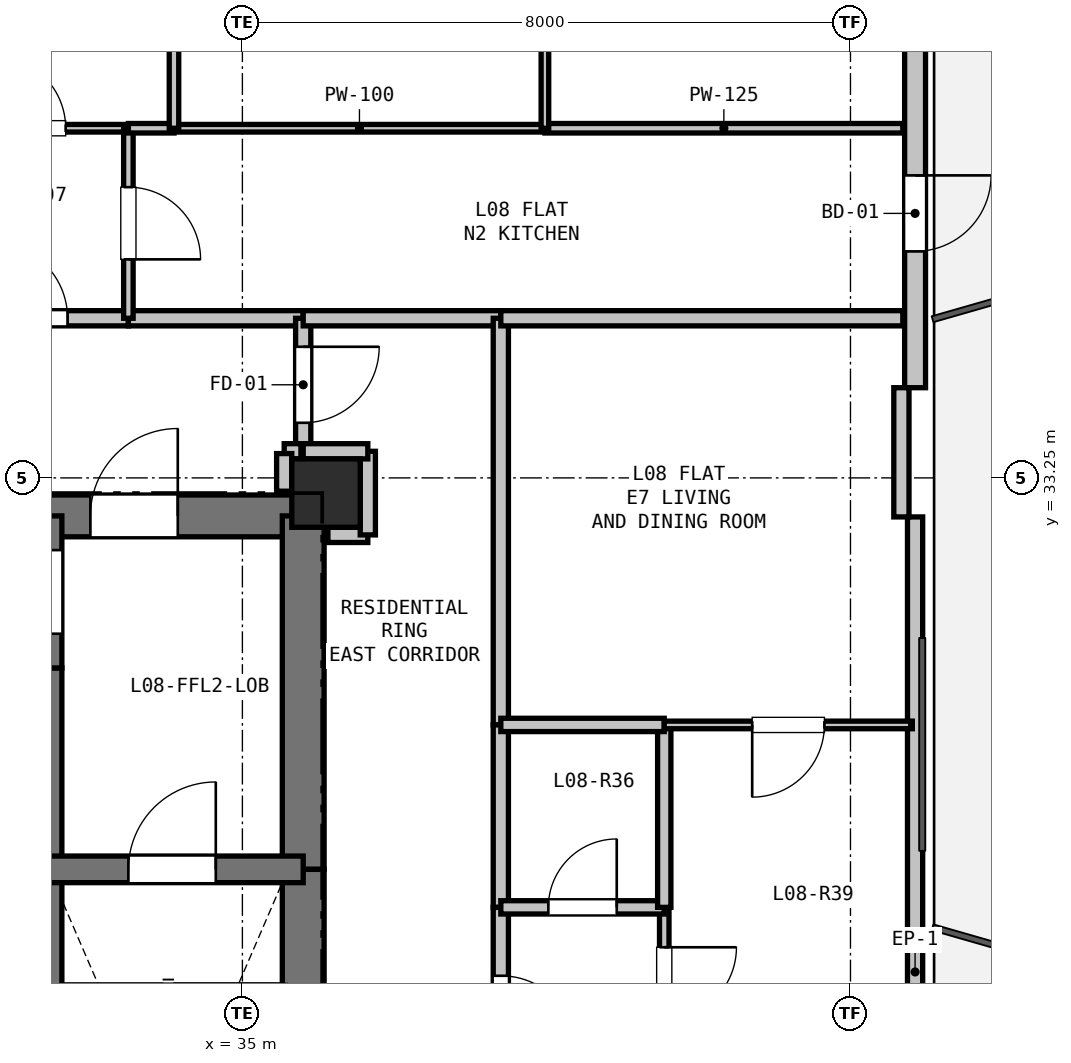
"""IFC4 building model, lengths in metres.
Left out: names, types, materials, properties, quantities, classifications, styles, units other than length and angle.
Written with IfcOpenShell. Run it as: python <this file> out.ifc"""

import sys

from ifc_helpers import new_model, si_unit, direction, frame, frame_2d, origin, origin_2d, place, context, subcontext, project, spatial, rectangle, extrude, element, fill, save


model = new_model("IFC4")
c1 = context("Model", 3, precision=1e-05, world=origin(), true_north=direction((0.0, 1.0)))
c2 = subcontext(c1, "Body", "Model", "MODEL_VIEW")
j1 = project(units=[si_unit("LENGTHUNIT", "METRE"), si_unit("PLANEANGLEUNIT", "RADIAN")], contexts=[c1])
p1 = place(None, origin())
s1 = spatial("IfcSite", under=j1, at=p1, CompositionType="ELEMENT")
p2 = place(p1, origin())
s2 = spatial("IfcBuilding", under=s1, at=p2, CompositionType="ELEMENT")
p3 = place(p2, frame((0.0, 0.0, 32.4)))
s3 = spatial("IfcBuildingStorey", under=s2, at=p3, CompositionType="ELEMENT", Elevation=32.4)
p4 = place(p3, frame((36.1, 33.05, 0.0), z_axis=(0.0, 0.0, 1.0), x_axis=(1.0, 0.0, 0.0)))
e1 = element("IfcColumn", 1, at=p4, inside=s3, PredefinedType="COLUMN", context=c2, shape_type="SweptSolid", body=[
    extrude(rectangle(XDim=0.9, YDim=0.9, at=origin_2d()), origin(), (0.0, 0.0, 1.0), 3.3),
])
p5 = place(p3, frame((43.85, 47.11, 0.0), z_axis=(0.0, 0.0, 1.0), x_axis=(0.0, -1.0, 0.0)))
e2 = element("IfcWall", 2, at=p5, inside=s3, PredefinedType="SOLIDWALL", context=c2, shape_type="SweptSolid", body=[
    extrude(rectangle(XDim=12.673, YDim=0.275, at=frame_2d((6.336, 0.0))), origin(), (0.0, 0.0, 1.0), 2.66),
])
p6 = place(p5, frame((9.88, 0.0, 0.0)))
e3 = element("IfcOpeningElement", 3, at=p6, cuts=e2, PredefinedType="OPENING", context=c2, shape_type="SweptSolid", body=[
    extrude(rectangle(XDim=1.0, YDim=2.1, at=frame_2d((0.5, 1.05))), frame((0.0, 0.147, 0.0), z_axis=(0.0, -1.0, 0.0), x_axis=(1.0, 0.0, 0.0)), (0.0, 0.0, 1.0), 0.295),
])
p7 = place(p3, frame((43.85, 32.737, 0.0), z_axis=(0.0, 0.0, 1.0), x_axis=(0.0, -1.0, 0.0)))
e4 = element("IfcWall", 4, at=p7, inside=s3, PredefinedType="PARAPET", context=c2, shape_type="SweptSolid", body=[
    extrude(rectangle(XDim=11.973, YDim=0.2, at=frame_2d((5.987, 0.0))), origin(), (0.0, 0.0, 1.0), 0.2),
])
p8 = place(p3, frame((43.67, 34.437, 0.0), z_axis=(0.0, 0.0, 1.0), x_axis=(0.0, -1.0, 0.0)))
e5 = element("IfcWall", 5, at=p8, inside=s3, PredefinedType="PARAPET", context=c2, shape_type="SweptSolid", body=[
    extrude(rectangle(XDim=1.7, YDim=0.2, at=frame_2d((0.85, 0.0))), origin(), (0.0, 0.0, 1.0), 2.66),
])
p9 = place(p3, frame((32.35, 32.75, 0.0), z_axis=(0.0, 0.0, 1.0), x_axis=(1.0, 0.0, 0.0)))
e6 = element("IfcWall", 6, at=p9, inside=s3, PredefinedType="SHEAR", context=c2, shape_type="SweptSolid", body=[
    extrude(rectangle(XDim=3.45, YDim=0.55, at=frame_2d((1.725, 0.0))), origin(), (0.0, 0.0, 1.0), 3.04),
])
p10 = place(p9, frame((0.65, 0.0, 0.0)))
e7 = element("IfcOpeningElement", 7, at=p10, cuts=e6, PredefinedType="OPENING", context=c2, shape_type="SweptSolid", body=[
    extrude(rectangle(XDim=1.15, YDim=2.15, at=frame_2d((0.575, 1.075))), frame((0.0, 0.285, 0.0), z_axis=(0.0, -1.0, 0.0), x_axis=(1.0, 0.0, 0.0)), (0.0, 0.0, 1.0), 0.57),
])
p11 = place(p3, frame((35.8, 32.75, 0.0), z_axis=(0.0, 0.0, 1.0), x_axis=(0.0, -1.0, 0.0)))
e8 = element("IfcWall", 8, at=p11, inside=s3, PredefinedType="SHEAR", context=c2, shape_type="SweptSolid", body=[
    extrude(rectangle(XDim=4.65, YDim=0.55, at=frame_2d((2.325, 0.0))), origin(), (0.0, 0.0, 1.0), 3.04),
])
p12 = place(p3, frame((35.8, 28.1, 0.0), z_axis=(0.0, 0.0, 1.0), x_axis=(0.0, -1.0, 0.0)))
e9 = element("IfcWall", 9, at=p12, inside=s3, PredefinedType="SHEAR", context=c2, shape_type="SweptSolid", body=[
    extrude(rectangle(XDim=7.35, YDim=0.55, at=frame_2d((3.675, 0.0))), origin(), (0.0, 0.0, 1.0), 3.04),
])
p13 = place(p3, frame((32.35, 25.55, 0.0), z_axis=(0.0, 0.0, 1.0), x_axis=(0.0, 1.0, 0.0)))
e10 = element("IfcWall", 10, at=p13, inside=s3, PredefinedType="SHEAR", context=c2, shape_type="SweptSolid", body=[
    extrude(rectangle(XDim=2.4, YDim=0.55, at=frame_2d((1.2, 0.0))), origin(), (0.0, 0.0, 1.0), 3.04),
])
p14 = place(p3, frame((32.35, 27.95, 0.0), z_axis=(0.0, 0.0, 1.0), x_axis=(0.0, 1.0, 0.0)))
e11 = element("IfcWall", 11, at=p14, inside=s3, PredefinedType="SHEAR", context=c2, shape_type="SweptSolid", body=[
    extrude(rectangle(XDim=2.8, YDim=0.55, at=frame_2d((1.4, 0.0))), origin(), (0.0, 0.0, 1.0), 3.04),
])
p15 = place(p3, frame((32.35, 30.75, 0.0), z_axis=(0.0, 0.0, 1.0), x_axis=(0.0, 1.0, 0.0)))
e12 = element("IfcWall", 12, at=p15, inside=s3, PredefinedType="SHEAR", context=c2, shape_type="SweptSolid", body=[
    extrude(rectangle(XDim=2.0, YDim=0.55, at=frame_2d((1.0, 0.0))), origin(), (0.0, 0.0, 1.0), 3.04),
])
p16 = place(p15, frame((0.45, 0.0, 0.0)))
e13 = element("IfcOpeningElement", 13, at=p16, cuts=e12, PredefinedType="OPENING", context=c2, shape_type="SweptSolid", body=[
    extrude(rectangle(XDim=1.1, YDim=2.15, at=frame_2d((0.55, 1.075))), frame((0.0, 0.285, 0.0), z_axis=(0.0, -1.0, 0.0), x_axis=(1.0, 0.0, 0.0)), (0.0, 0.0, 1.0), 0.57),
])
p17 = place(p3, frame((32.35, 28.1, 0.0), z_axis=(0.0, 0.0, 1.0), x_axis=(1.0, 0.0, 0.0)))
e14 = element("IfcWall", 14, at=p17, inside=s3, PredefinedType="SHEAR", context=c2, shape_type="SweptSolid", body=[
    extrude(rectangle(XDim=3.45, YDim=0.35, at=frame_2d((1.725, 0.0))), origin(), (0.0, 0.0, 1.0), 3.04),
])
p18 = place(p17, frame((1.15, 0.0, 0.0)))
e15 = element("IfcOpeningElement", 15, at=p18, cuts=e14, PredefinedType="OPENING", context=c2, shape_type="SweptSolid", body=[
    extrude(rectangle(XDim=1.15, YDim=2.15, at=frame_2d((0.575, 1.075))), frame((0.0, 0.185, 0.0), z_axis=(0.0, -1.0, 0.0), x_axis=(1.0, 0.0, 0.0)), (0.0, 0.0, 1.0), 0.37),
])
p19 = place(p3, frame((30.9, 35.35, 0.0), z_axis=(0.0, 0.0, 1.0), x_axis=(1.0, 0.0, 0.0)))
e16 = element("IfcWall", 16, at=p19, inside=s3, PredefinedType="PARTITIONING", context=c2, shape_type="SweptSolid", body=[
    extrude(rectangle(XDim=2.6, YDim=0.2, at=frame_2d((1.3, 0.0))), origin(), (0.0, 0.0, 1.0), 3.04),
])
p20 = place(p19, frame((0.8, 0.0, 0.0)))
e17 = element("IfcOpeningElement", 17, at=p20, cuts=e16, PredefinedType="OPENING", context=c2, shape_type="SweptSolid", body=[
    extrude(rectangle(XDim=1.0, YDim=2.15, at=frame_2d((0.5, 1.075))), frame((0.0, 0.11, 0.0), z_axis=(0.0, -1.0, 0.0), x_axis=(1.0, 0.0, 0.0)), (0.0, 0.0, 1.0), 0.22),
])
p21 = place(p3, frame((33.5, 35.35, 0.0), z_axis=(0.0, 0.0, 1.0), x_axis=(1.0, 0.0, 0.0)))
e18 = element("IfcWall", 18, at=p21, inside=s3, PredefinedType="PARTITIONING", context=c2, shape_type="SweptSolid", body=[
    extrude(rectangle(XDim=2.3, YDim=0.2, at=frame_2d((1.15, 0.0))), origin(), (0.0, 0.0, 1.0), 3.04),
])
p22 = place(p3, frame((35.8, 35.35, 0.0), z_axis=(0.0, 0.0, 1.0), x_axis=(0.0, -1.0, 0.0)))
e19 = element("IfcWall", 19, at=p22, inside=s3, PredefinedType="PARTITIONING", context=c2, shape_type="SweptSolid", body=[
    extrude(rectangle(XDim=1.75, YDim=0.2, at=frame_2d((0.875, 0.0))), origin(), (0.0, 0.0, 1.0), 3.04),
])
p23 = place(p22, frame((0.375, 0.0, 0.0)))
e20 = element("IfcOpeningElement", 20, at=p23, cuts=e19, PredefinedType="OPENING", context=c2, shape_type="SweptSolid", body=[
    extrude(rectangle(XDim=1.0, YDim=2.15, at=frame_2d((0.5, 1.075))), frame((0.0, 0.11, 0.0), z_axis=(0.0, -1.0, 0.0), x_axis=(1.0, 0.0, 0.0)), (0.0, 0.0, 1.0), 0.22),
])
p24 = place(p3, frame((35.77, 33.6, 0.0), z_axis=(0.0, 0.0, 1.0), x_axis=(-1.0, 0.0, 0.0)))
e21 = element("IfcWall", 21, at=p24, inside=s3, PredefinedType="PARTITIONING", context=c2, shape_type="SweptSolid", body=[
    extrude(rectangle(XDim=0.22, YDim=0.2, at=frame_2d((0.11, 0.0))), origin(), (0.0, 0.0, 1.0), 3.04),
])
p25 = place(p3, frame((35.55, 33.57, 0.0), z_axis=(0.0, 0.0, 1.0), x_axis=(0.0, -1.0, 0.0)))
e22 = element("IfcWall", 22, at=p25, inside=s3, PredefinedType="PARTITIONING", context=c2, shape_type="SweptSolid", body=[
    extrude(rectangle(XDim=0.495, YDim=0.2, at=frame_2d((0.248, 0.0))), origin(), (0.0, 0.0, 1.0), 2.488),
])
p26 = place(p3, frame((36.125, 32.5, 0.0), z_axis=(0.0, 0.0, 1.0), x_axis=(1.0, 0.0, 0.0)))
e23 = element("IfcWall", 23, at=p26, inside=s3, PredefinedType="PARTITIONING", context=c2, shape_type="SweptSolid", body=[
    extrude(rectangle(XDim=0.525, YDim=0.2, at=frame_2d((0.262, 0.0))), origin(), (0.0, 0.0, 1.0), 2.488),
])
p27 = place(p3, frame((36.65, 32.5, 0.0), z_axis=(0.0, 0.0, 1.0), x_axis=(0.0, 1.0, 0.0)))
e24 = element("IfcWall", 24, at=p27, inside=s3, PredefinedType="PARTITIONING", context=c2, shape_type="SweptSolid", body=[
    extrude(rectangle(XDim=1.1, YDim=0.2, at=frame_2d((0.55, 0.0))), origin(), (0.0, 0.0, 1.0), 2.338),
])
p28 = place(p3, frame((36.65, 33.6, 0.0), z_axis=(0.0, 0.0, 1.0), x_axis=(-1.0, 0.0, 0.0)))
e25 = element("IfcWall", 25, at=p28, inside=s3, PredefinedType="PARTITIONING", context=c2, shape_type="SweptSolid", body=[
    extrude(rectangle(XDim=0.85, YDim=0.2, at=frame_2d((0.425, 0.0))), origin(), (0.0, 0.0, 1.0), 2.338),
])
p29 = place(p3, frame((35.8, 35.35, 0.0), z_axis=(0.0, 0.0, 1.0), x_axis=(1.0, 0.0, 0.0)))
e26 = element("IfcWall", 26, at=p29, inside=s3, PredefinedType="PARTITIONING", context=c2, shape_type="SweptSolid", body=[
    extrude(rectangle(XDim=2.6, YDim=0.2, at=frame_2d((1.3, 0.0))), origin(), (0.0, 0.0, 1.0), 2.338),
])
p30 = place(p3, frame((38.4, 35.35, 0.0), z_axis=(0.0, 0.0, 1.0), x_axis=(0.0, -1.0, 0.0)))
e27 = element("IfcWall", 27, at=p30, inside=s3, PredefinedType="PARTITIONING", context=c2, shape_type="SweptSolid", body=[
    extrude(rectangle(XDim=5.35, YDim=0.2, at=frame_2d((2.675, 0.0))), origin(), (0.0, 0.0, 1.0), 2.338),
])
p31 = place(p3, frame((38.4, 30.0, 0.0), z_axis=(0.0, 0.0, 1.0), x_axis=(0.0, -1.0, 0.0)))
e28 = element("IfcWall", 28, at=p31, inside=s3, PredefinedType="PARTITIONING", context=c2, shape_type="SweptSolid", body=[
    extrude(rectangle(XDim=2.4, YDim=0.2, at=frame_2d((1.2, 0.0))), origin(), (0.0, 0.0, 1.0), 3.04),
])
p32 = place(p3, frame((38.4, 27.6, 0.0), z_axis=(0.0, 0.0, 1.0), x_axis=(0.0, -1.0, 0.0)))
e29 = element("IfcWall", 29, at=p32, inside=s3, PredefinedType="PARTITIONING", context=c2, shape_type="SweptSolid", body=[
    extrude(rectangle(XDim=2.8, YDim=0.2, at=frame_2d((1.4, 0.0))), origin(), (0.0, 0.0, 1.0), 3.04),
])
p33 = place(p32, frame((0.9, 0.0, 0.0)))
e30 = element("IfcOpeningElement", 30, at=p33, cuts=e29, PredefinedType="OPENING", context=c2, shape_type="SweptSolid", body=[
    extrude(rectangle(XDim=1.0, YDim=2.15, at=frame_2d((0.5, 1.075))), frame((0.0, 0.11, 0.0), z_axis=(0.0, -1.0, 0.0), x_axis=(1.0, 0.0, 0.0)), (0.0, 0.0, 1.0), 0.22),
])
p34 = place(p3, frame((30.9, 37.85, 0.0), z_axis=(0.0, 0.0, 1.0), x_axis=(1.0, 0.0, 0.0)))
e31 = element("IfcWall", 31, at=p34, inside=s3, PredefinedType="PARTITIONING", context=c2, shape_type="SweptSolid", body=[
    extrude(rectangle(XDim=2.6, YDim=0.1, at=frame_2d((1.3, 0.0))), origin(), (0.0, 0.0, 1.0), 3.04),
])
p35 = place(p34, frame((0.825, 0.0, 0.0)))
e32 = element("IfcOpeningElement", 32, at=p35, cuts=e31, PredefinedType="OPENING", context=c2, shape_type="SweptSolid", body=[
    extrude(rectangle(XDim=0.95, YDim=2.1, at=frame_2d((0.475, 1.05))), frame((0.0, 0.06, 0.0), z_axis=(0.0, -1.0, 0.0), x_axis=(1.0, 0.0, 0.0)), (0.0, 0.0, 1.0), 0.12),
])
p36 = place(p3, frame((33.5, 37.85, 0.0), z_axis=(0.0, 0.0, 1.0), x_axis=(0.0, -1.0, 0.0)))
e33 = element("IfcWall", 33, at=p36, inside=s3, PredefinedType="PARTITIONING", context=c2, shape_type="SweptSolid", body=[
    extrude(rectangle(XDim=2.5, YDim=0.125, at=frame_2d((1.25, 0.0))), origin(), (0.0, 0.0, 1.0), 3.04),
])
p37 = place(p36, frame((0.775, 0.0, 0.0)))
e34 = element("IfcOpeningElement", 34, at=p37, cuts=e33, PredefinedType="OPENING", context=c2, shape_type="SweptSolid", body=[
    extrude(rectangle(XDim=0.95, YDim=2.1, at=frame_2d((0.475, 1.05))), frame((0.0, 0.073, 0.0), z_axis=(0.0, -1.0, 0.0), x_axis=(1.0, 0.0, 0.0)), (0.0, 0.0, 1.0), 0.145),
])
p38 = place(p3, frame((40.55, 27.6, 0.0), z_axis=(0.0, 0.0, 1.0), x_axis=(0.0, -1.0, 0.0)))
e35 = element("IfcWall", 35, at=p38, inside=s3, PredefinedType="PARTITIONING", context=c2, shape_type="SweptSolid", body=[
    extrude(rectangle(XDim=2.0, YDim=0.125, at=frame_2d((1.0, 0.0))), origin(), (0.0, 0.0, 1.0), 3.04),
])
p39 = place(p38, frame((0.525, 0.0, 0.0)))
e36 = element("IfcOpeningElement", 36, at=p39, cuts=e35, PredefinedType="OPENING", context=c2, shape_type="SweptSolid", body=[
    extrude(rectangle(XDim=0.95, YDim=2.1, at=frame_2d((0.475, 1.05))), frame((0.0, 0.073, 0.0), z_axis=(0.0, -1.0, 0.0), x_axis=(1.0, 0.0, 0.0)), (0.0, 0.0, 1.0), 0.145),
])
p40 = place(p3, frame((38.4, 27.6, 0.0), z_axis=(0.0, 0.0, 1.0), x_axis=(1.0, 0.0, 0.0)))
e37 = element("IfcWall", 37, at=p40, inside=s3, PredefinedType="PLUMBINGWALL", context=c2, shape_type="SweptSolid", body=[
    extrude(rectangle(XDim=2.15, YDim=0.175, at=frame_2d((1.075, 0.0))), origin(), (0.0, 0.0, 1.0), 3.04),
])
p41 = place(p40, frame((0.625, 0.0, 0.0)))
e38 = element("IfcOpeningElement", 38, at=p41, cuts=e37, PredefinedType="OPENING", context=c2, shape_type="SweptSolid", body=[
    extrude(rectangle(XDim=0.9, YDim=2.1, at=frame_2d((0.45, 1.05))), frame((0.0, 0.097, 0.0), z_axis=(0.0, -1.0, 0.0), x_axis=(1.0, 0.0, 0.0)), (0.0, 0.0, 1.0), 0.195),
])
p42 = place(p3, frame((43.688, 35.35, 0.0), z_axis=(0.0, 0.0, 1.0), x_axis=(-1.0, 0.0, 0.0)))
e39 = element("IfcWall", 39, at=p42, inside=s3, PredefinedType="PARTITIONING", context=c2, shape_type="SweptSolid", body=[
    extrude(rectangle(XDim=5.289, YDim=0.2, at=frame_2d((2.644, 0.0))), origin(), (0.0, 0.0, 1.0), 2.338),
])
p43 = place(p3, frame((33.5, 37.85, 0.0), z_axis=(0.0, 0.0, 1.0), x_axis=(1.0, 0.0, 0.0)))
e40 = element("IfcWall", 40, at=p43, inside=s3, PredefinedType="PARTITIONING", context=c2, shape_type="SweptSolid", body=[
    extrude(rectangle(XDim=0.6, YDim=0.125, at=frame_2d((0.3, 0.0))), origin(), (0.0, 0.0, 1.0), 3.04),
])
p44 = place(p3, frame((34.1, 37.85, 0.0), z_axis=(0.0, 0.0, 1.0), x_axis=(1.0, 0.0, 0.0)))
e41 = element("IfcWall", 41, at=p44, inside=s3, PredefinedType="PARTITIONING", context=c2, shape_type="SweptSolid", body=[
    extrude(rectangle(XDim=4.88, YDim=0.1, at=frame_2d((2.44, 0.0))), origin(), (0.0, 0.0, 1.0), 2.338),
])
p45 = place(p3, frame((38.98, 37.85, 0.0), z_axis=(0.0, 0.0, 1.0), x_axis=(1.0, 0.0, 0.0)))
e42 = element("IfcWall", 42, at=p45, inside=s3, PredefinedType="PARTITIONING", context=c2, shape_type="SweptSolid", body=[
    extrude(rectangle(XDim=4.708, YDim=0.125, at=frame_2d((2.354, 0.0))), origin(), (0.0, 0.0, 1.0), 2.338),
])
p46 = place(p3, frame((40.55, 30.0, 0.0), z_axis=(0.0, 0.0, 1.0), x_axis=(0.0, -1.0, 0.0)))
e43 = element("IfcWall", 43, at=p46, inside=s3, PredefinedType="PLUMBINGWALL", context=c2, shape_type="SweptSolid", body=[
    extrude(rectangle(XDim=2.4, YDim=0.175, at=frame_2d((1.2, 0.0))), origin(), (0.0, 0.0, 1.0), 3.04),
])
p47 = place(p3, frame((38.4, 30.0, 0.0), z_axis=(0.0, 0.0, 1.0), x_axis=(1.0, 0.0, 0.0)))
e44 = element("IfcWall", 44, at=p47, inside=s3, PredefinedType="PLUMBINGWALL", context=c2, shape_type="SweptSolid", body=[
    extrude(rectangle(XDim=2.15, YDim=0.175, at=frame_2d((1.075, 0.0))), origin(), (0.0, 0.0, 1.0), 3.04),
])
p48 = place(p3, frame((34.1, 43.86, 0.0), z_axis=(0.0, 0.0, 1.0), x_axis=(0.0, -1.0, 0.0)))
e45 = element("IfcWall", 45, at=p48, inside=s3, PredefinedType="PARTITIONING", context=c2, shape_type="SweptSolid", body=[
    extrude(rectangle(XDim=6.01, YDim=0.125, at=frame_2d((3.005, 0.0))), origin(), (0.0, 0.0, 1.0), 3.04),
])
p49 = place(p48, frame((2.53, 0.0, 0.0)))
e46 = element("IfcOpeningElement", 46, at=p49, cuts=e45, PredefinedType="OPENING", context=c2, shape_type="SweptSolid", body=[
    extrude(rectangle(XDim=0.95, YDim=2.1, at=frame_2d((0.475, 1.05))), frame((0.0, 0.073, 0.0), z_axis=(0.0, -1.0, 0.0), x_axis=(1.0, 0.0, 0.0)), (0.0, 0.0, 1.0), 0.145),
])
p50 = place(p3, frame((38.98, 43.86, 0.0), z_axis=(0.0, 0.0, 1.0), x_axis=(0.0, -1.0, 0.0)))
e47 = element("IfcWall", 47, at=p50, inside=s3, PredefinedType="PARTITIONING", context=c2, shape_type="SweptSolid", body=[
    extrude(rectangle(XDim=6.01, YDim=0.1, at=frame_2d((3.005, 0.0))), origin(), (0.0, 0.0, 1.0), 3.04),
])
p51 = place(p50, frame((2.53, 0.0, 0.0)))
e48 = element("IfcOpeningElement", 48, at=p51, cuts=e47, PredefinedType="OPENING", context=c2, shape_type="SweptSolid", body=[
    extrude(rectangle(XDim=0.95, YDim=2.1, at=frame_2d((0.475, 1.05))), frame((0.0, 0.06, 0.0), z_axis=(0.0, -1.0, 0.0), x_axis=(1.0, 0.0, 0.0)), (0.0, 0.0, 1.0), 0.12),
])
p52 = place(p3, frame((43.814, 30.0, 0.0), z_axis=(0.0, 0.0, 1.0), x_axis=(-1.0, 0.0, 0.0)))
e49 = element("IfcWall", 49, at=p52, inside=s3, PredefinedType="PARTITIONING", context=c2, shape_type="SweptSolid", body=[
    extrude(rectangle(XDim=3.264, YDim=0.1, at=frame_2d((1.632, 0.0))), origin(), (0.0, 0.0, 1.0), 2.365),
])
p53 = place(p52, frame((1.157, 0.0, 0.0)))
e50 = element("IfcOpeningElement", 50, at=p53, cuts=e49, PredefinedType="OPENING", context=c2, shape_type="SweptSolid", body=[
    extrude(rectangle(XDim=0.95, YDim=2.1, at=frame_2d((0.475, 1.05))), frame((0.0, 0.06, 0.0), z_axis=(0.0, -1.0, 0.0), x_axis=(1.0, 0.0, 0.0)), (0.0, 0.0, 1.0), 0.12),
])
p54 = place(p6, origin())
e51 = element("IfcDoor", 51, at=p54, inside=s3, OperationType="SINGLE_SWING_LEFT", PredefinedType="DOOR", context=c2, shape_type="SweptSolid", body=[
    extrude(rectangle(XDim=1.0, YDim=2.1, at=frame_2d((0.5, 1.05))), frame((0.0, 0.025, 0.0), z_axis=(0.0, -1.0, 0.0), x_axis=(1.0, 0.0, 0.0)), (0.0, 0.0, 1.0), 0.05),
])
fill(e3, e51)
p55 = place(p18, origin())
e52 = element("IfcDoor", 52, at=p55, inside=s3, OperationType="SINGLE_SWING_RIGHT", PredefinedType="DOOR", context=c2, shape_type="SweptSolid", body=[
    extrude(rectangle(XDim=1.15, YDim=2.15, at=frame_2d((0.575, 1.075))), frame((0.0, 0.025, 0.0), z_axis=(0.0, -1.0, 0.0), x_axis=(1.0, 0.0, 0.0)), (0.0, 0.0, 1.0), 0.05),
])
fill(e15, e52)
p56 = place(p10, origin())
e53 = element("IfcDoor", 53, at=p56, inside=s3, OperationType="SINGLE_SWING_RIGHT", PredefinedType="DOOR", context=c2, shape_type="SweptSolid", body=[
    extrude(rectangle(XDim=1.15, YDim=2.15, at=frame_2d((0.575, 1.075))), frame((0.0, 0.025, 0.0), z_axis=(0.0, -1.0, 0.0), x_axis=(1.0, 0.0, 0.0)), (0.0, 0.0, 1.0), 0.05),
])
fill(e7, e53)
p57 = place(p23, origin())
e54 = element("IfcDoor", 54, at=p57, inside=s3, OperationType="SINGLE_SWING_LEFT", PredefinedType="DOOR", context=c2, shape_type="SweptSolid", body=[
    extrude(rectangle(XDim=1.0, YDim=2.15, at=frame_2d((0.5, 1.075))), frame((0.0, 0.025, 0.0), z_axis=(0.0, -1.0, 0.0), x_axis=(1.0, 0.0, 0.0)), (0.0, 0.0, 1.0), 0.05),
])
fill(e20, e54)
p58 = place(p20, origin())
e55 = element("IfcDoor", 55, at=p58, inside=s3, OperationType="SINGLE_SWING_LEFT", PredefinedType="DOOR", context=c2, shape_type="SweptSolid", body=[
    extrude(rectangle(XDim=1.0, YDim=2.15, at=frame_2d((0.5, 1.075))), frame((0.0, 0.025, 0.0), z_axis=(0.0, -1.0, 0.0), x_axis=(1.0, 0.0, 0.0)), (0.0, 0.0, 1.0), 0.05),
])
fill(e17, e55)
p59 = place(p33, origin())
e56 = element("IfcDoor", 56, at=p59, inside=s3, OperationType="SINGLE_SWING_RIGHT", PredefinedType="DOOR", context=c2, shape_type="SweptSolid", body=[
    extrude(rectangle(XDim=1.0, YDim=2.15, at=frame_2d((0.5, 1.075))), frame((0.0, 0.025, 0.0), z_axis=(0.0, -1.0, 0.0), x_axis=(1.0, 0.0, 0.0)), (0.0, 0.0, 1.0), 0.05),
])
fill(e30, e56)
p60 = place(p37, origin())
e57 = element("IfcDoor", 57, at=p60, inside=s3, OperationType="SINGLE_SWING_RIGHT", PredefinedType="DOOR", context=c2, shape_type="SweptSolid", body=[
    extrude(rectangle(XDim=0.95, YDim=2.1, at=frame_2d((0.475, 1.05))), frame((0.0, 0.025, 0.0), z_axis=(0.0, -1.0, 0.0), x_axis=(1.0, 0.0, 0.0)), (0.0, 0.0, 1.0), 0.05),
])
fill(e34, e57)
p61 = place(p35, origin())
e58 = element("IfcDoor", 58, at=p61, inside=s3, OperationType="SINGLE_SWING_LEFT", PredefinedType="DOOR", context=c2, shape_type="SweptSolid", body=[
    extrude(rectangle(XDim=0.95, YDim=2.1, at=frame_2d((0.475, 1.05))), frame((0.0, 0.025, 0.0), z_axis=(0.0, -1.0, 0.0), x_axis=(1.0, 0.0, 0.0)), (0.0, 0.0, 1.0), 0.05),
])
fill(e32, e58)
p62 = place(p41, origin())
e59 = element("IfcDoor", 59, at=p62, inside=s3, OperationType="SINGLE_SWING_RIGHT", PredefinedType="DOOR", context=c2, shape_type="SweptSolid", body=[
    extrude(rectangle(XDim=0.9, YDim=2.1, at=frame_2d((0.45, 1.05))), frame((0.0, 0.025, 0.0), z_axis=(0.0, -1.0, 0.0), x_axis=(1.0, 0.0, 0.0)), (0.0, 0.0, 1.0), 0.05),
])
fill(e38, e59)
p63 = place(p39, origin())
e60 = element("IfcDoor", 60, at=p63, inside=s3, OperationType="SINGLE_SWING_LEFT", PredefinedType="DOOR", context=c2, shape_type="SweptSolid", body=[
    extrude(rectangle(XDim=0.95, YDim=2.1, at=frame_2d((0.475, 1.05))), frame((0.0, 0.025, 0.0), z_axis=(0.0, -1.0, 0.0), x_axis=(1.0, 0.0, 0.0)), (0.0, 0.0, 1.0), 0.05),
])
fill(e36, e60)
p64 = place(p53, origin())
e61 = element("IfcDoor", 61, at=p64, inside=s3, OperationType="SINGLE_SWING_RIGHT", PredefinedType="DOOR", context=c2, shape_type="SweptSolid", body=[
    extrude(rectangle(XDim=0.95, YDim=2.1, at=frame_2d((0.475, 1.05))), frame((0.0, 0.025, 0.0), z_axis=(0.0, -1.0, 0.0), x_axis=(1.0, 0.0, 0.0)), (0.0, 0.0, 1.0), 0.05),
])
fill(e50, e61)
save(model, sys.argv[1])
